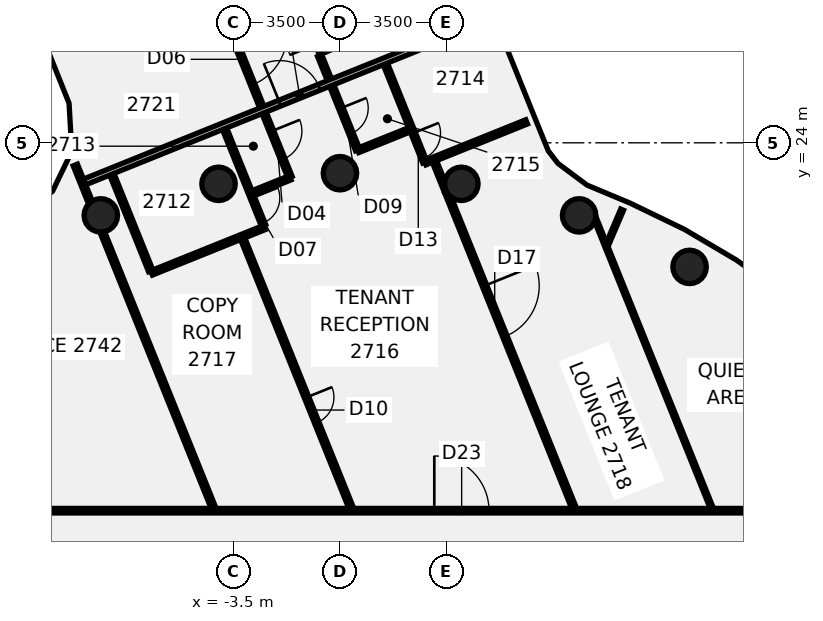
"""IFC4 building model, lengths in metres.
Left out: names, types, materials, properties, quantities, classifications, styles, units other than length and angle.
Written with IfcOpenShell. Run it as: python <this file> out.ifc"""

import sys

from ifc_helpers import new_model, si_unit, direction, frame, frame_2d, origin, origin_2d, place, context, subcontext, project, spatial, rectangle, circle, extrude, element, fill, save


model = new_model("IFC4")
c1 = context("Model", 3, precision=1e-05, world=origin(), true_north=direction((0.0, 1.0)))
c2 = subcontext(c1, "Body", "Model", "MODEL_VIEW")
j1 = project(units=[si_unit("LENGTHUNIT", "METRE"), si_unit("PLANEANGLEUNIT", "RADIAN")], contexts=[c1])
p1 = place(None, origin())
s1 = spatial("IfcSite", under=j1, at=p1, CompositionType="ELEMENT")
p2 = place(p1, origin())
s2 = spatial("IfcBuilding", under=s1, at=p2, CompositionType="ELEMENT")
p3 = place(p2, frame((0.0, 0.0, 113.5)))
s3 = spatial("IfcBuildingStorey", under=s2, at=p3, CompositionType="ELEMENT", Elevation=113.5)
for number, where, z_axis, x_axis in (
    (1, (11.5, 19.919, -0.14), (0.0, 0.0, 1.0), (1.0, 0.0, 0.0)),
    (2, (7.866, 21.613, -0.14), (0.0, 0.0, 1.0), (1.0, 0.0, 0.0)),
    (3, (3.994, 22.651, -0.14), (0.0, 0.0, 1.0), (1.0, 0.0, 0.0)),
    (4, (0.0, 23.0, -0.14), (0.0, 0.0, 1.0), (1.0, 0.0, 0.0)),
    (5, (-3.994, 22.651, -0.14), (0.0, 0.0, 1.0), (1.0, 0.0, 0.0)),
    (6, (-7.866, 21.613, -0.14), (0.0, 0.0, 1.0), (1.0, 0.0, 0.0)),
):
    element("IfcColumn", number, at=place(p3, frame(where, z_axis=z_axis, x_axis=x_axis)), inside=s3, PredefinedType="COLUMN", context=c2, shape_type="SweptSolid", body=[
        extrude(circle(Radius=0.55, at=origin_2d()), origin(), (0.0, 0.0, 1.0), 3.75),
    ])
p4 = place(p3, frame((-8.203, 27.644, -0.139), z_axis=(-0.027071017843, -0.040085930267, 0.998829454005), x_axis=(0.927195791465, 0.372426997279, 0.040076127407)))
e7 = element("IfcColumn", 7, at=p4, inside=s3, PredefinedType="COLUMN", context=c2, shape_type="SweptSolid", body=[
    extrude(rectangle(XDim=1.1, YDim=1.1, at=origin_2d()), origin(), (0.0, 0.0, 1.0), 3.752),
])
p5 = place(p3, frame((-8.705, 23.27, 0.0), z_axis=(0.0, 0.0, 1.0), x_axis=(0.37370081595, -0.927549297967, 0.0)))
e8 = element("IfcWall", 8, at=p5, inside=s3, PredefinedType="PARTITIONING", context=c2, shape_type="SweptSolid", body=[
    extrude(rectangle(XDim=1.33, YDim=0.15, at=frame_2d((0.665, 0.0))), origin(), (0.0, 0.0, 1.0), 3.01),
])
p6 = place(p3, frame((-7.817, 21.066, 0.0), z_axis=(0.0, 0.0, 1.0), x_axis=(0.373620675782, -0.927581581656, 0.0)))
e9 = element("IfcWall", 9, at=p6, inside=s3, PredefinedType="PARTITIONING", context=c2, shape_type="SweptSolid", body=[
    extrude(rectangle(XDim=9.792, YDim=0.15, at=frame_2d((4.896, 0.0))), origin(), (0.0, 0.0, 1.0), 3.01),
])
p7 = place(p3, frame((-7.505, 22.966, 0.0), z_axis=(0.0, 0.0, 1.0), x_axis=(0.373515454624, -0.927623956761, 0.0)))
e10 = element("IfcWall", 10, at=p7, inside=s3, PredefinedType="PARTITIONING", context=c2, shape_type="SweptSolid", body=[
    extrude(rectangle(XDim=3.426, YDim=0.15, at=frame_2d((1.713, 0.0))), origin(), (0.0, 0.0, 1.0), 3.01),
])
p8 = place(p3, frame((-5.868, 33.355, 0.0), z_axis=(0.0, 0.0, 1.0), x_axis=(0.373686710096, -0.927554980957, 0.0)))
e11 = element("IfcWall", 11, at=p8, inside=s3, PredefinedType="PARTITIONING", context=c2, shape_type="SweptSolid", body=[
    extrude(rectangle(XDim=11.306, YDim=0.15, at=frame_2d((5.653, 0.0))), origin(), (0.0, 0.0, 1.0), 3.01),
])
p9 = place(p8, frame((9.676, 0.0, 0.0)))
e12 = element("IfcOpeningElement", 12, at=p9, cuts=e11, PredefinedType="OPENING", context=c2, shape_type="SweptSolid", body=[
    extrude(rectangle(XDim=1.0, YDim=2.1, at=frame_2d((0.5, 1.05))), frame((0.0, 0.085, 0.0), z_axis=(0.0, -1.0, 0.0), x_axis=(1.0, 0.0, 0.0)), (0.0, 0.0, 1.0), 0.17),
])
p10 = place(p8, frame((0.975, 0.0, 0.0)))
e13 = element("IfcOpeningElement", 13, at=p10, cuts=e11, PredefinedType="OPENING", context=c2, shape_type="SweptSolid", body=[
    extrude(rectangle(XDim=1.8, YDim=2.1, at=frame_2d((0.9, 1.05))), frame((0.0, 0.085, 0.0), z_axis=(0.0, -1.0, 0.0), x_axis=(1.0, 0.0, 0.0)), (0.0, 0.0, 1.0), 0.17),
])
p11 = place(p8, frame((6.226, 0.0, 0.0)))
e14 = element("IfcOpeningElement", 14, at=p11, cuts=e11, PredefinedType="OPENING", context=c2, shape_type="SweptSolid", body=[
    extrude(rectangle(XDim=1.8, YDim=2.1, at=frame_2d((0.9, 1.05))), frame((0.0, 0.085, 0.0), z_axis=(0.0, -1.0, 0.0), x_axis=(1.0, 0.0, 0.0)), (0.0, 0.0, 1.0), 0.17),
])
p12 = place(p3, frame((-3.795, 24.46, 0.0), z_axis=(0.0, 0.0, 1.0), x_axis=(0.373945590209, -0.927450643195, 0.0)))
e15 = element("IfcWall", 15, at=p12, inside=s3, PredefinedType="PARTITIONING", context=c2, shape_type="SweptSolid", body=[
    extrude(rectangle(XDim=3.425, YDim=0.15, at=frame_2d((1.712, 0.0))), origin(), (0.0, 0.0, 1.0), 3.01),
])
p13 = place(p12, frame((2.45, 0.0, 0.0)))
e16 = element("IfcOpeningElement", 16, at=p13, cuts=e15, PredefinedType="OPENING", context=c2, shape_type="SweptSolid", body=[
    extrude(rectangle(XDim=0.9, YDim=2.1, at=frame_2d((0.45, 1.05))), frame((0.0, 0.085, 0.0), z_axis=(0.0, -1.0, 0.0), x_axis=(1.0, 0.0, 0.0)), (0.0, 0.0, 1.0), 0.17),
])
p14 = place(p3, frame((-0.666, 26.864, 0.0), z_axis=(0.0, 0.0, 1.0), x_axis=(0.373632679027, -0.927576746778, 0.0)))
e17 = element("IfcWall", 17, at=p14, inside=s3, PredefinedType="PARTITIONING", context=c2, shape_type="SweptSolid", body=[
    extrude(rectangle(XDim=3.34, YDim=0.15, at=frame_2d((1.67, 0.0))), origin(), (0.0, 0.0, 1.0), 3.01),
])
p15 = place(p14, frame((1.86, 0.0, 0.0)))
e18 = element("IfcOpeningElement", 18, at=p15, cuts=e17, PredefinedType="OPENING", context=c2, shape_type="SweptSolid", body=[
    extrude(rectangle(XDim=0.9, YDim=2.1, at=frame_2d((0.45, 1.05))), frame((0.0, 0.085, 0.0), z_axis=(0.0, -1.0, 0.0), x_axis=(1.0, 0.0, 0.0)), (0.0, 0.0, 1.0), 0.17),
])
p16 = place(p3, frame((-3.2, 20.845, 0.0), z_axis=(0.0, 0.0, 1.0), x_axis=(0.373601376601, -0.927589354942, 0.0)))
e19 = element("IfcWall", 19, at=p16, inside=s3, PredefinedType="PARTITIONING", context=c2, shape_type="SweptSolid", body=[
    extrude(rectangle(XDim=9.554, YDim=0.15, at=frame_2d((4.777, 0.0))), origin(), (0.0, 0.0, 1.0), 3.01),
])
p17 = place(p16, frame((5.625, 0.0, 0.0)))
e20 = element("IfcOpeningElement", 20, at=p17, cuts=e19, PredefinedType="OPENING", context=c2, shape_type="SweptSolid", body=[
    extrude(rectangle(XDim=0.9, YDim=2.1, at=frame_2d((0.45, 1.05))), frame((0.0, 0.085, 0.0), z_axis=(0.0, -1.0, 0.0), x_axis=(1.0, 0.0, 0.0)), (0.0, 0.0, 1.0), 0.17),
])
p18 = place(p3, frame((1.491, 26.595, 0.0), z_axis=(0.0, 0.0, 1.0), x_axis=(0.373419109665, -0.927662745041, 0.0)))
e21 = element("IfcWall", 21, at=p18, inside=s3, PredefinedType="PARTITIONING", context=c2, shape_type="SweptSolid", body=[
    extrude(rectangle(XDim=3.485, YDim=0.15, at=frame_2d((1.742, 0.0))), origin(), (0.0, 0.0, 1.0), 3.01),
])
p19 = place(p18, frame((2.455, 0.0, 0.0)))
e22 = element("IfcOpeningElement", 22, at=p19, cuts=e21, PredefinedType="OPENING", context=c2, shape_type="SweptSolid", body=[
    extrude(rectangle(XDim=0.9, YDim=2.1, at=frame_2d((0.45, 1.05))), frame((0.0, 0.085, 0.0), z_axis=(0.0, -1.0, 0.0), x_axis=(1.0, 0.0, 0.0)), (0.0, 0.0, 1.0), 0.17),
])
p20 = place(p3, frame((3.109, 23.382, 0.0), z_axis=(0.0, 0.0, 1.0), x_axis=(0.373633465101, -0.927576430143, 0.0)))
e23 = element("IfcWall", 23, at=p20, inside=s3, PredefinedType="PARTITIONING", context=c2, shape_type="SweptSolid", body=[
    extrude(rectangle(XDim=1.032, YDim=0.15, at=frame_2d((0.516, 0.0))), origin(), (0.0, 0.0, 1.0), 3.01),
])
p21 = place(p3, frame((3.521, 22.358, 0.0), z_axis=(0.0, 0.0, 1.0), x_axis=(0.373640057319, -0.92757377473, 0.0)))
e24 = element("IfcWall", 24, at=p21, inside=s3, PredefinedType="PARTITIONING", context=c2, shape_type="SweptSolid", body=[
    extrude(rectangle(XDim=11.185, YDim=0.15, at=frame_2d((5.593, 0.0))), origin(), (0.0, 0.0, 1.0), 3.01),
])
p22 = place(p21, frame((3.3, 0.0, 0.0)))
e25 = element("IfcOpeningElement", 25, at=p22, cuts=e24, PredefinedType="OPENING", context=c2, shape_type="SweptSolid", body=[
    extrude(rectangle(XDim=1.8, YDim=2.1, at=frame_2d((0.9, 1.05))), frame((0.0, 0.085, 0.0), z_axis=(0.0, -1.0, 0.0), x_axis=(1.0, 0.0, 0.0)), (0.0, 0.0, 1.0), 0.17),
])
p23 = place(p3, frame((8.396, 21.498, 0.0), z_axis=(0.0, 0.0, 1.0), x_axis=(0.373673072067, -0.927560475232, 0.0)))
e26 = element("IfcWall", 26, at=p23, inside=s3, PredefinedType="PARTITIONING", context=c2, shape_type="SweptSolid", body=[
    extrude(rectangle(XDim=10.267, YDim=0.1, at=frame_2d((5.134, 0.0))), origin(), (0.0, 0.0, 1.0), 3.01),
])
p24 = place(p3, frame((-17.065, 11.9, 0.0), z_axis=(0.0, 0.0, 1.0), x_axis=(1.0, 0.0, 0.0)))
e27 = element("IfcWall", 27, at=p24, inside=s3, PredefinedType="PARTITIONING", context=c2, shape_type="SweptSolid", body=[
    extrude(rectangle(XDim=34.165, YDim=0.15, at=frame_2d((17.083, 0.0))), origin(), (0.0, 0.0, 1.0), 3.01),
])
p25 = place(p24, frame((20.168, 0.0, 0.0)))
e28 = element("IfcOpeningElement", 28, at=p25, cuts=e27, PredefinedType="OPENING", context=c2, shape_type="SweptSolid", body=[
    extrude(rectangle(XDim=1.8, YDim=2.1, at=frame_2d((0.9, 1.05))), frame((0.0, 0.085, 0.0), z_axis=(0.0, -1.0, 0.0), x_axis=(1.0, 0.0, 0.0)), (0.0, 0.0, 1.0), 0.17),
])
p26 = place(p24, frame((31.277, 0.0, 0.0)))
e29 = element("IfcOpeningElement", 29, at=p26, cuts=e27, PredefinedType="OPENING", context=c2, shape_type="SweptSolid", body=[
    extrude(rectangle(XDim=1.8, YDim=2.1, at=frame_2d((0.9, 1.05))), frame((0.0, 0.085, 0.0), z_axis=(0.0, -1.0, 0.0), x_axis=(1.0, 0.0, 0.0)), (0.0, 0.0, 1.0), 0.17),
])
p27 = place(p24, frame((5.665, 0.0, 0.0)))
e30 = element("IfcOpeningElement", 30, at=p27, cuts=e27, PredefinedType="OPENING", context=c2, shape_type="SweptSolid", body=[
    extrude(rectangle(XDim=1.8, YDim=2.1, at=frame_2d((0.9, 1.05))), frame((0.0, 0.085, 0.0), z_axis=(0.0, -1.0, 0.0), x_axis=(1.0, 0.0, 0.0)), (0.0, 0.0, 1.0), 0.17),
])
p28 = place(p3, frame((-8.399, 22.713, 0.0), z_axis=(0.0, 0.0, 1.0), x_axis=(0.927366941988, 0.374153116929, 0.0)))
e31 = element("IfcWall", 31, at=p28, inside=s3, PredefinedType="PARTITIONING", context=c2, shape_type="SweptSolid", body=[
    extrude(rectangle(XDim=14.224, YDim=0.2, at=frame_2d((7.112, 0.0))), origin(), (0.0, 0.0, 1.0), 3.01),
])
p29 = place(p28, frame((6.925, 0.0, 0.0)))
e32 = element("IfcOpeningElement", 32, at=p29, cuts=e31, PredefinedType="OPENING", context=c2, shape_type="SweptSolid", body=[
    extrude(rectangle(XDim=1.4, YDim=2.1, at=frame_2d((0.7, 1.05))), frame((0.0, 0.11, 0.0), z_axis=(0.0, -1.0, 0.0), x_axis=(1.0, 0.0, 0.0)), (0.0, 0.0, 1.0), 0.22),
])
p30 = place(p3, frame((-6.197, 19.719, 0.0), z_axis=(0.0, 0.0, 1.0), x_axis=(0.927569092415, 0.373651681109, 0.0)))
e33 = element("IfcWall", 33, at=p30, inside=s3, PredefinedType="PARTITIONING", context=c2, shape_type="SweptSolid", body=[
    extrude(rectangle(XDim=4.001, YDim=0.15, at=frame_2d((2.0, 0.0))), origin(), (0.0, 0.0, 1.0), 3.01),
])
p31 = place(p3, frame((2.801, 23.344, 0.0), z_axis=(0.0, 0.0, 1.0), x_axis=(0.927561707099, 0.373670014216, 0.0)))
e34 = element("IfcWall", 34, at=p31, inside=s3, PredefinedType="PARTITIONING", context=c2, shape_type="SweptSolid", body=[
    extrude(rectangle(XDim=3.599, YDim=0.15, at=frame_2d((1.8, 0.0))), origin(), (0.0, 0.0, 1.0), 3.01),
])
p32 = place(p3, frame((-2.861, 22.357, 0.0), z_axis=(0.0, 0.0, 1.0), x_axis=(0.927632702766, 0.373493733225, 0.0)))
e35 = element("IfcWall", 35, at=p32, inside=s3, PredefinedType="PARTITIONING", context=c2, shape_type="SweptSolid", body=[
    extrude(rectangle(XDim=1.32, YDim=0.15, at=frame_2d((0.66, 0.0))), origin(), (0.0, 0.0, 1.0), 3.01),
])
p33 = place(p3, frame((0.59, 23.746, 0.0), z_axis=(0.0, 0.0, 1.0), x_axis=(0.92765314986, 0.373442945515, 0.0)))
e36 = element("IfcWall", 36, at=p33, inside=s3, PredefinedType="PARTITIONING", context=c2, shape_type="SweptSolid", body=[
    extrude(rectangle(XDim=1.825, YDim=0.15, at=frame_2d((0.912, 0.0))), origin(), (0.0, 0.0, 1.0), 3.01),
])
p34 = place(p3, frame((8.802, 20.678, 0.0), z_axis=(0.0, 0.0, 1.0), x_axis=(0.392106771025, 0.919919713951, 0.0)))
e37 = element("IfcWall", 37, at=p34, inside=s3, PredefinedType="PARTITIONING", context=c2, shape_type="SweptSolid", body=[
    extrude(rectangle(XDim=1.22, YDim=0.1, at=frame_2d((0.61, 0.0))), origin(), (0.0, 0.0, 1.0), 3.01),
])
p35 = place(p3, frame((-0.588, 26.938, -0.14), z_axis=(0.0, 0.0, 1.0), x_axis=(-0.373638711668, 0.927574316776, 0.0)))
e38 = element("IfcWall", 38, at=p35, inside=s3, PredefinedType="SHEAR", context=c2, shape_type="SweptSolid", body=[
    extrude(rectangle(XDim=6.7, YDim=0.2, at=frame_2d((3.35, 0.0))), origin(), (0.0, 0.0, 1.0), 3.15),
])
p36 = place(p35, frame((0.35, 0.0, 0.0)))
e39 = element("IfcOpeningElement", 39, at=p36, cuts=e38, PredefinedType="OPENING", context=c2, shape_type="SweptSolid", body=[
    extrude(rectangle(XDim=1.0, YDim=2.1, at=frame_2d((0.5, 1.05))), frame((0.0, 0.11, 0.0), z_axis=(0.0, -1.0, 0.0), x_axis=(1.0, 0.0, 0.0)), (0.0, 0.0, 1.0), 0.22),
])
p37 = place(p9, frame((1.0, 0.0, 0.0), z_axis=(0.0, 0.0, 1.0), x_axis=(-1.0, 0.0, 0.0)))
e40 = element("IfcDoor", 40, at=p37, inside=s3, OperationType="SINGLE_SWING_RIGHT", PredefinedType="DOOR", context=c2, shape_type="SweptSolid", body=[
    extrude(rectangle(XDim=1.0, YDim=2.1, at=frame_2d((0.5, 1.05))), frame((0.0, 0.025, 0.0), z_axis=(0.0, -1.0, 0.0), x_axis=(1.0, 0.0, 0.0)), (0.0, 0.0, 1.0), 0.05),
])
fill(e12, e40)
p38 = place(p11, frame((1.8, 0.0, 0.0), z_axis=(0.0, 0.0, 1.0), x_axis=(-1.0, 0.0, 0.0)))
e41 = element("IfcDoor", 41, at=p38, inside=s3, OperationType="DOUBLE_DOOR_SINGLE_SWING", PredefinedType="DOOR", context=c2, shape_type="SweptSolid", body=[
    extrude(rectangle(XDim=1.8, YDim=2.1, at=frame_2d((0.9, 1.05))), frame((0.0, 0.025, 0.0), z_axis=(0.0, -1.0, 0.0), x_axis=(1.0, 0.0, 0.0)), (0.0, 0.0, 1.0), 0.05),
])
fill(e14, e41)
p39 = place(p13, frame((0.9, 0.0, 0.0), z_axis=(0.0, 0.0, 1.0), x_axis=(-1.0, 0.0, 0.0)))
e42 = element("IfcDoor", 42, at=p39, inside=s3, OperationType="SINGLE_SWING_RIGHT", PredefinedType="DOOR", context=c2, shape_type="SweptSolid", body=[
    extrude(rectangle(XDim=0.9, YDim=2.1, at=frame_2d((0.45, 1.05))), frame((0.0, 0.025, 0.0), z_axis=(0.0, -1.0, 0.0), x_axis=(1.0, 0.0, 0.0)), (0.0, 0.0, 1.0), 0.05),
])
fill(e16, e42)
p40 = place(p15, origin())
e43 = element("IfcDoor", 43, at=p40, inside=s3, OperationType="SINGLE_SWING_LEFT", PredefinedType="DOOR", context=c2, shape_type="SweptSolid", body=[
    extrude(rectangle(XDim=0.9, YDim=2.1, at=frame_2d((0.45, 1.05))), frame((0.0, 0.025, 0.0), z_axis=(0.0, -1.0, 0.0), x_axis=(1.0, 0.0, 0.0)), (0.0, 0.0, 1.0), 0.05),
])
fill(e18, e43)
p41 = place(p17, frame((0.9, 0.0, 0.0), z_axis=(0.0, 0.0, 1.0), x_axis=(-1.0, 0.0, 0.0)))
e44 = element("IfcDoor", 44, at=p41, inside=s3, OperationType="SINGLE_SWING_RIGHT", PredefinedType="DOOR", context=c2, shape_type="SweptSolid", body=[
    extrude(rectangle(XDim=0.9, YDim=2.1, at=frame_2d((0.45, 1.05))), frame((0.0, 0.025, 0.0), z_axis=(0.0, -1.0, 0.0), x_axis=(1.0, 0.0, 0.0)), (0.0, 0.0, 1.0), 0.05),
])
fill(e20, e44)
p42 = place(p19, origin())
e45 = element("IfcDoor", 45, at=p42, inside=s3, OperationType="SINGLE_SWING_LEFT", PredefinedType="DOOR", context=c2, shape_type="SweptSolid", body=[
    extrude(rectangle(XDim=0.9, YDim=2.1, at=frame_2d((0.45, 1.05))), frame((0.0, 0.025, 0.0), z_axis=(0.0, -1.0, 0.0), x_axis=(1.0, 0.0, 0.0)), (0.0, 0.0, 1.0), 0.05),
])
fill(e22, e45)
p43 = place(p22, origin())
e46 = element("IfcDoor", 46, at=p43, inside=s3, OperationType="DOUBLE_DOOR_SINGLE_SWING", PredefinedType="DOOR", context=c2, shape_type="SweptSolid", body=[
    extrude(rectangle(XDim=1.8, YDim=2.1, at=frame_2d((0.9, 1.05))), frame((0.0, 0.025, 0.0), z_axis=(0.0, -1.0, 0.0), x_axis=(1.0, 0.0, 0.0)), (0.0, 0.0, 1.0), 0.05),
])
fill(e25, e46)
p44 = place(p25, frame((1.8, 0.0, 0.0), z_axis=(0.0, 0.0, 1.0), x_axis=(-1.0, 0.0, 0.0)))
e47 = element("IfcDoor", 47, at=p44, inside=s3, OperationType="DOUBLE_DOOR_SINGLE_SWING", PredefinedType="DOOR", context=c2, shape_type="SweptSolid", body=[
    extrude(rectangle(XDim=1.8, YDim=2.1, at=frame_2d((0.9, 1.05))), frame((0.0, 0.025, 0.0), z_axis=(0.0, -1.0, 0.0), x_axis=(1.0, 0.0, 0.0)), (0.0, 0.0, 1.0), 0.05),
])
fill(e28, e47)
p45 = place(p29, frame((1.4, 0.0, 0.0), z_axis=(0.0, 0.0, 1.0), x_axis=(-1.0, 0.0, 0.0)))
e48 = element("IfcDoor", 48, at=p45, inside=s3, OperationType="DOUBLE_DOOR_SINGLE_SWING", PredefinedType="DOOR", context=c2, shape_type="SweptSolid", body=[
    extrude(rectangle(XDim=1.4, YDim=2.1, at=frame_2d((0.7, 1.05))), frame((0.0, 0.025, 0.0), z_axis=(0.0, -1.0, 0.0), x_axis=(1.0, 0.0, 0.0)), (0.0, 0.0, 1.0), 0.05),
])
fill(e32, e48)
save(model, sys.argv[1])
